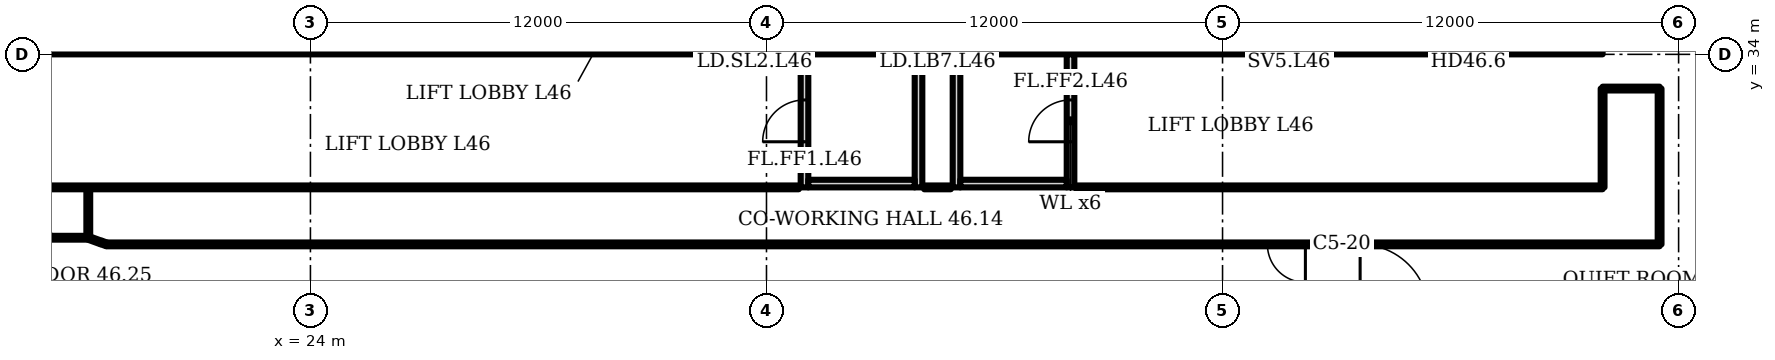
"""IFC4 building model, lengths in metres.
Left out: names, types, materials, properties, quantities, classifications, styles, units other than length and angle.
Written with IfcOpenShell. Run it as: python <this file> out.ifc"""

import sys

from ifc_helpers import new_model, si_unit, direction, frame, frame_2d, origin, place, context, subcontext, project, spatial, rectangle, extrude, element, fill, save


model = new_model("IFC4")
c1 = context("Model", 3, precision=1e-05, world=origin(), true_north=direction((0.0, 1.0)))
c2 = subcontext(c1, "Body", "Model", "MODEL_VIEW")
j1 = project(units=[si_unit("LENGTHUNIT", "METRE"), si_unit("PLANEANGLEUNIT", "RADIAN")], contexts=[c1])
p1 = place(None, origin())
s1 = spatial("IfcSite", under=j1, at=p1, CompositionType="ELEMENT")
p2 = place(p1, origin())
s2 = spatial("IfcBuilding", under=s1, at=p2, CompositionType="ELEMENT")
p3 = place(p2, frame((0.0, 0.0, 187.9)))
s3 = spatial("IfcBuildingStorey", under=s2, at=p3, CompositionType="ELEMENT", Elevation=187.9)
p4 = place(p3, frame((16.0, 34.4, 0.0), z_axis=(0.0, 0.0, 1.0), x_axis=(1.0, 0.0, 0.0)))
e1 = element("IfcWall", 1, at=p4, inside=s3, PredefinedType="SHEAR", context=c2, shape_type="SweptSolid", body=[
    extrude(rectangle(XDim=42.0, YDim=0.8, at=frame_2d((21.0, 0.0))), origin(), (0.0, 0.0, 1.0), 3.6),
])
p5 = place(p4, frame((3.2, 0.0, 0.0)))
e2 = element("IfcOpeningElement", 2, at=p5, cuts=e1, PredefinedType="OPENING", context=c2, shape_type="SweptSolid", body=[
    extrude(rectangle(XDim=1.0, YDim=2.1, at=frame_2d((0.5, 1.05))), frame((0.0, 0.41, 0.0), z_axis=(0.0, -1.0, 0.0), x_axis=(1.0, 0.0, 0.0)), (0.0, 0.0, 1.0), 0.82),
])
p6 = place(p4, frame((7.65, 0.0, 0.0)))
e3 = element("IfcOpeningElement", 3, at=p6, cuts=e1, PredefinedType="OPENING", context=c2, shape_type="SweptSolid", body=[
    extrude(rectangle(XDim=1.2, YDim=2.1, at=frame_2d((0.6, 1.05))), frame((0.0, 0.41, 0.0), z_axis=(0.0, -1.0, 0.0), x_axis=(1.0, 0.0, 0.0)), (0.0, 0.0, 1.0), 0.82),
])
p7 = place(p4, frame((14.767, 0.0, 0.0)))
e4 = element("IfcOpeningElement", 4, at=p7, cuts=e1, PredefinedType="OPENING", context=c2, shape_type="SweptSolid", body=[
    extrude(rectangle(XDim=1.1, YDim=2.1, at=frame_2d((0.55, 1.05))), frame((0.0, 0.41, 0.0), z_axis=(0.0, -1.0, 0.0), x_axis=(1.0, 0.0, 0.0)), (0.0, 0.0, 1.0), 0.82),
])
p8 = place(p4, frame((19.133, 0.0, 0.0)))
e5 = element("IfcOpeningElement", 5, at=p8, cuts=e1, PredefinedType="OPENING", context=c2, shape_type="SweptSolid", body=[
    extrude(rectangle(XDim=1.1, YDim=2.1, at=frame_2d((0.55, 1.05))), frame((0.0, 0.41, 0.0), z_axis=(0.0, -1.0, 0.0), x_axis=(1.0, 0.0, 0.0)), (0.0, 0.0, 1.0), 0.82),
])
p9 = place(p4, frame((16.8, 0.0, 0.0)))
e6 = element("IfcOpeningElement", 6, at=p9, cuts=e1, PredefinedType="OPENING", context=c2, shape_type="SweptSolid", body=[
    extrude(rectangle(XDim=1.4, YDim=2.1, at=frame_2d((0.7, 1.05))), frame((0.0, 0.41, 0.0), z_axis=(0.0, -1.0, 0.0), x_axis=(1.0, 0.0, 0.0)), (0.0, 0.0, 1.0), 0.82),
])
p10 = place(p4, frame((21.767, 0.0, 0.0)))
e7 = element("IfcOpeningElement", 7, at=p10, cuts=e1, PredefinedType="OPENING", context=c2, shape_type="SweptSolid", body=[
    extrude(rectangle(XDim=1.1, YDim=2.1, at=frame_2d((0.55, 1.05))), frame((0.0, 0.41, 0.0), z_axis=(0.0, -1.0, 0.0), x_axis=(1.0, 0.0, 0.0)), (0.0, 0.0, 1.0), 0.82),
])
p11 = place(p4, frame((23.95, 0.0, 0.0)))
e8 = element("IfcOpeningElement", 8, at=p11, cuts=e1, PredefinedType="OPENING", context=c2, shape_type="SweptSolid", body=[
    extrude(rectangle(XDim=1.1, YDim=2.1, at=frame_2d((0.55, 1.05))), frame((0.0, 0.41, 0.0), z_axis=(0.0, -1.0, 0.0), x_axis=(1.0, 0.0, 0.0)), (0.0, 0.0, 1.0), 0.82),
])
p12 = place(p4, frame((26.133, 0.0, 0.0)))
e9 = element("IfcOpeningElement", 9, at=p12, cuts=e1, PredefinedType="OPENING", context=c2, shape_type="SweptSolid", body=[
    extrude(rectangle(XDim=1.1, YDim=2.1, at=frame_2d((0.55, 1.05))), frame((0.0, 0.41, 0.0), z_axis=(0.0, -1.0, 0.0), x_axis=(1.0, 0.0, 0.0)), (0.0, 0.0, 1.0), 0.82),
])
p13 = place(p4, frame((33.15, 0.0, 0.0)))
e10 = element("IfcOpeningElement", 10, at=p13, cuts=e1, PredefinedType="OPENING", context=c2, shape_type="SweptSolid", body=[
    extrude(rectangle(XDim=1.2, YDim=2.1, at=frame_2d((0.6, 1.05))), frame((0.0, 0.41, 0.0), z_axis=(0.0, -1.0, 0.0), x_axis=(1.0, 0.0, 0.0)), (0.0, 0.0, 1.0), 0.82),
])
p14 = place(p4, frame((35.817, 0.0, 0.0)))
e11 = element("IfcOpeningElement", 11, at=p14, cuts=e1, PredefinedType="OPENING", context=c2, shape_type="SweptSolid", body=[
    extrude(rectangle(XDim=1.0, YDim=2.1, at=frame_2d((0.5, 1.05))), frame((0.0, 0.41, 0.0), z_axis=(0.0, -1.0, 0.0), x_axis=(1.0, 0.0, 0.0)), (0.0, 0.0, 1.0), 0.82),
])
p15 = place(p4, frame((39.95, 0.0, 0.0)))
e12 = element("IfcOpeningElement", 12, at=p15, cuts=e1, PredefinedType="OPENING", context=c2, shape_type="SweptSolid", body=[
    extrude(rectangle(XDim=1.0, YDim=2.1, at=frame_2d((0.5, 1.05))), frame((0.0, 0.41, 0.0), z_axis=(0.0, -1.0, 0.0), x_axis=(1.0, 0.0, 0.0)), (0.0, 0.0, 1.0), 0.82),
])
p16 = place(p4, frame((37.767, 0.0, 0.0)))
e13 = element("IfcOpeningElement", 13, at=p16, cuts=e1, PredefinedType="OPENING", context=c2, shape_type="SweptSolid", body=[
    extrude(rectangle(XDim=1.4, YDim=2.1, at=frame_2d((0.7, 1.05))), frame((0.0, 0.41, 0.0), z_axis=(0.0, -1.0, 0.0), x_axis=(1.0, 0.0, 0.0)), (0.0, 0.0, 1.0), 0.82),
])
p17 = place(p3, frame((37.0, 30.5, 0.0), z_axis=(0.0, 0.0, 1.0), x_axis=(0.0, 1.0, 0.0)))
e14 = element("IfcWall", 14, at=p17, inside=s3, PredefinedType="PARTITIONING", context=c2, shape_type="SweptSolid", body=[
    extrude(rectangle(XDim=3.5, YDim=0.2, at=frame_2d((1.75, 0.0))), origin(), (0.0, 0.0, 1.0), 3.2),
])
p18 = place(p17, frame((1.2, 0.0, 0.0)))
e15 = element("IfcOpeningElement", 15, at=p18, cuts=e14, PredefinedType="OPENING", context=c2, shape_type="SweptSolid", body=[
    extrude(rectangle(XDim=1.1, YDim=2.1, at=frame_2d((0.55, 1.05))), frame((0.0, 0.11, 0.0), z_axis=(0.0, -1.0, 0.0), x_axis=(1.0, 0.0, 0.0)), (0.0, 0.0, 1.0), 0.22),
])
p19 = place(p3, frame((40.0, 30.5, 0.0), z_axis=(0.0, 0.0, 1.0), x_axis=(0.0, 1.0, 0.0)))
e16 = element("IfcWall", 16, at=p19, inside=s3, PredefinedType="PARTITIONING", context=c2, shape_type="SweptSolid", body=[
    extrude(rectangle(XDim=3.5, YDim=0.2, at=frame_2d((1.75, 0.0))), origin(), (0.0, 0.0, 1.0), 3.2),
])
p20 = place(p3, frame((37.1, 30.6, 0.0), z_axis=(0.0, 0.0, 1.0), x_axis=(1.0, 0.0, 0.0)))
e17 = element("IfcWall", 17, at=p20, inside=s3, PredefinedType="PARTITIONING", context=c2, shape_type="SweptSolid", body=[
    extrude(rectangle(XDim=2.8, YDim=0.2, at=frame_2d((1.4, 0.0))), origin(), (0.0, 0.0, 1.0), 3.2),
])
p21 = place(p3, frame((41.0, 30.5, 0.0), z_axis=(0.0, 0.0, 1.0), x_axis=(0.0, 1.0, 0.0)))
e18 = element("IfcWall", 18, at=p21, inside=s3, PredefinedType="PARTITIONING", context=c2, shape_type="SweptSolid", body=[
    extrude(rectangle(XDim=3.5, YDim=0.2, at=frame_2d((1.75, 0.0))), origin(), (0.0, 0.0, 1.0), 3.2),
])
p22 = place(p3, frame((44.0, 30.5, 0.0), z_axis=(0.0, 0.0, 1.0), x_axis=(0.0, 1.0, 0.0)))
e19 = element("IfcWall", 19, at=p22, inside=s3, PredefinedType="PARTITIONING", context=c2, shape_type="SweptSolid", body=[
    extrude(rectangle(XDim=3.5, YDim=0.2, at=frame_2d((1.75, 0.0))), origin(), (0.0, 0.0, 1.0), 3.2),
])
p23 = place(p22, frame((1.2, 0.0, 0.0)))
e20 = element("IfcOpeningElement", 20, at=p23, cuts=e19, PredefinedType="OPENING", context=c2, shape_type="SweptSolid", body=[
    extrude(rectangle(XDim=1.1, YDim=2.1, at=frame_2d((0.55, 1.05))), frame((0.0, 0.11, 0.0), z_axis=(0.0, -1.0, 0.0), x_axis=(1.0, 0.0, 0.0)), (0.0, 0.0, 1.0), 0.22),
])
p24 = place(p3, frame((41.1, 30.6, 0.0), z_axis=(0.0, 0.0, 1.0), x_axis=(1.0, 0.0, 0.0)))
e21 = element("IfcWall", 21, at=p24, inside=s3, PredefinedType="PARTITIONING", context=c2, shape_type="SweptSolid", body=[
    extrude(rectangle(XDim=2.8, YDim=0.2, at=frame_2d((1.4, 0.0))), origin(), (0.0, 0.0, 1.0), 3.2),
])
p25 = place(p3, frame((16.0, 30.5, 0.0), z_axis=(0.0, 0.0, 1.0), x_axis=(1.0, 0.0, 0.0)))
e22 = element("IfcWall", 22, at=p25, inside=s3, PredefinedType="PARTITIONING", context=c2, shape_type="SweptSolid", body=[
    extrude(rectangle(XDim=20.85, YDim=0.1, at=frame_2d((10.425, 0.0))), origin(), (0.0, 0.0, 1.0), 3.2),
])
p26 = place(p3, frame((17.185, 29.175, 0.0), z_axis=(0.0, 0.0, 1.0), x_axis=(1.0, 0.0, 0.0)))
e23 = element("IfcWall", 23, at=p26, inside=s3, PredefinedType="PARTITIONING", context=c2, shape_type="SweptSolid", body=[
    extrude(rectangle(XDim=0.97, YDim=0.1, at=frame_2d((0.485, 0.0))), origin(), (0.0, 0.0, 1.0), 3.2),
])
p27 = place(p3, frame((18.155, 29.18, 0.0), z_axis=(0.0, 0.0, 1.0), x_axis=(0.0, 1.0, 0.0)))
e24 = element("IfcWall", 24, at=p27, inside=s3, PredefinedType="PARTITIONING", context=c2, shape_type="SweptSolid", body=[
    extrude(rectangle(XDim=1.32, YDim=0.1, at=frame_2d((0.66, 0.0))), origin(), (0.0, 0.0, 1.0), 3.2),
])
p28 = place(p3, frame((18.49, 29.05, 0.0), z_axis=(0.0, 0.0, 1.0), x_axis=(-0.939932, 0.341351, 0.0)))
e25 = element("IfcWall", 25, at=p28, inside=s3, PredefinedType="PARTITIONING", context=c2, shape_type="SweptSolid", body=[
    extrude(rectangle(XDim=0.351, YDim=0.1, at=frame_2d((0.176, 0.0))), origin(), (0.0, 0.0, 1.0), 3.2),
])
p29 = place(p3, frame((18.635, 29.0, 0.0), z_axis=(0.0, 0.0, 1.0), x_axis=(-0.937648, 0.347591, 0.0)))
e26 = element("IfcWall", 26, at=p29, inside=s3, PredefinedType="PARTITIONING", context=c2, shape_type="SweptSolid", body=[
    extrude(rectangle(XDim=0.144, YDim=0.1, at=frame_2d((0.072, 0.0))), origin(), (0.0, 0.0, 1.0), 3.2),
])
p30 = place(p3, frame((18.635, 29.0, 0.0), z_axis=(0.0, 0.0, 1.0), x_axis=(1.0, 0.0, 0.0)))
e27 = element("IfcWall", 27, at=p30, inside=s3, PredefinedType="PARTITIONING", context=c2, shape_type="SweptSolid", body=[
    extrude(rectangle(XDim=40.865, YDim=0.1, at=frame_2d((20.433, 0.0))), origin(), (0.0, 0.0, 1.0), 3.2),
])
p31 = place(p30, frame((30.545, 0.0, 0.0)))
e28 = element("IfcOpeningElement", 28, at=p31, cuts=e27, PredefinedType="OPENING", context=c2, shape_type="SweptSolid", body=[
    extrude(rectangle(XDim=1.0, YDim=2.1, at=frame_2d((0.5, 1.05))), frame((0.0, 0.06, 0.0), z_axis=(0.0, -1.0, 0.0), x_axis=(1.0, 0.0, 0.0)), (0.0, 0.0, 1.0), 0.12),
])
p32 = place(p3, frame((58.0, 30.5, 0.0), z_axis=(0.0, 0.0, 1.0), x_axis=(0.0, 1.0, 0.0)))
e29 = element("IfcWall", 29, at=p32, inside=s3, PredefinedType="PARTITIONING", context=c2, shape_type="SweptSolid", body=[
    extrude(rectangle(XDim=2.6, YDim=0.1, at=frame_2d((1.3, 0.0))), origin(), (0.0, 0.0, 1.0), 3.2),
])
p33 = place(p3, frame((58.0, 33.1, 0.0), z_axis=(0.0, 0.0, 1.0), x_axis=(1.0, 0.0, 0.0)))
e30 = element("IfcWall", 30, at=p33, inside=s3, PredefinedType="PARTITIONING", context=c2, shape_type="SweptSolid", body=[
    extrude(rectangle(XDim=1.5, YDim=0.1, at=frame_2d((0.75, 0.0))), origin(), (0.0, 0.0, 1.0), 3.2),
])
p34 = place(p3, frame((59.5, 29.0, 0.0), z_axis=(0.0, 0.0, 1.0), x_axis=(0.0, 1.0, 0.0)))
e31 = element("IfcWall", 31, at=p34, inside=s3, PredefinedType="PARTITIONING", context=c2, shape_type="SweptSolid", body=[
    extrude(rectangle(XDim=4.1, YDim=0.1, at=frame_2d((2.05, 0.0))), origin(), (0.0, 0.0, 1.0), 3.2),
])
p35 = place(p3, frame((40.15, 30.5, 0.0), z_axis=(0.0, 0.0, 1.0), x_axis=(1.0, 0.0, 0.0)))
e32 = element("IfcWall", 32, at=p35, inside=s3, PredefinedType="PARTITIONING", context=c2, shape_type="SweptSolid", body=[
    extrude(rectangle(XDim=0.7, YDim=0.1, at=frame_2d((0.35, 0.0))), origin(), (0.0, 0.0, 1.0), 3.2),
])
p36 = place(p3, frame((44.15, 30.5, 0.0), z_axis=(0.0, 0.0, 1.0), x_axis=(1.0, 0.0, 0.0)))
e33 = element("IfcWall", 33, at=p36, inside=s3, PredefinedType="PARTITIONING", context=c2, shape_type="SweptSolid", body=[
    extrude(rectangle(XDim=13.85, YDim=0.1, at=frame_2d((6.925, 0.0))), origin(), (0.0, 0.0, 1.0), 3.2),
])
p37 = place(p5, origin())
e34 = element("IfcDoor", 34, at=p37, inside=s3, OperationType="SINGLE_SWING_LEFT", PredefinedType="DOOR", context=c2, shape_type="SweptSolid", body=[
    extrude(rectangle(XDim=1.0, YDim=2.1, at=frame_2d((0.5, 1.05))), frame((0.0, 0.4, 0.0), z_axis=(0.0, -1.0, 0.0), x_axis=(1.0, 0.0, 0.0)), (0.0, 0.0, 1.0), 0.8),
])
fill(e2, e34)
p38 = place(p14, origin())
e35 = element("IfcDoor", 35, at=p38, inside=s3, OperationType="SINGLE_SWING_LEFT", PredefinedType="DOOR", context=c2, shape_type="SweptSolid", body=[
    extrude(rectangle(XDim=1.0, YDim=2.1, at=frame_2d((0.5, 1.05))), frame((0.0, 0.4, 0.0), z_axis=(0.0, -1.0, 0.0), x_axis=(1.0, 0.0, 0.0)), (0.0, 0.0, 1.0), 0.8),
])
fill(e11, e35)
p39 = place(p15, origin())
e36 = element("IfcDoor", 36, at=p39, inside=s3, OperationType="SINGLE_SWING_LEFT", PredefinedType="DOOR", context=c2, shape_type="SweptSolid", body=[
    extrude(rectangle(XDim=1.0, YDim=2.1, at=frame_2d((0.5, 1.05))), frame((0.0, 0.4, 0.0), z_axis=(0.0, -1.0, 0.0), x_axis=(1.0, 0.0, 0.0)), (0.0, 0.0, 1.0), 0.8),
])
fill(e12, e36)
p40 = place(p18, origin())
e37 = element("IfcDoor", 37, at=p40, inside=s3, OperationType="SINGLE_SWING_LEFT", PredefinedType="DOOR", context=c2, shape_type="SweptSolid", body=[
    extrude(rectangle(XDim=1.1, YDim=2.1, at=frame_2d((0.55, 1.05))), frame((0.0, 0.025, 0.0), z_axis=(0.0, -1.0, 0.0), x_axis=(1.0, 0.0, 0.0)), (0.0, 0.0, 1.0), 0.05),
])
fill(e15, e37)
p41 = place(p23, origin())
e38 = element("IfcDoor", 38, at=p41, inside=s3, OperationType="SINGLE_SWING_LEFT", PredefinedType="DOOR", context=c2, shape_type="SweptSolid", body=[
    extrude(rectangle(XDim=1.1, YDim=2.1, at=frame_2d((0.55, 1.05))), frame((0.0, 0.025, 0.0), z_axis=(0.0, -1.0, 0.0), x_axis=(1.0, 0.0, 0.0)), (0.0, 0.0, 1.0), 0.05),
])
fill(e20, e38)
p42 = place(p31, origin())
e39 = element("IfcDoor", 39, at=p42, inside=s3, OperationType="SINGLE_SWING_RIGHT", PredefinedType="DOOR", context=c2, shape_type="SweptSolid", body=[
    extrude(rectangle(XDim=1.0, YDim=2.1, at=frame_2d((0.5, 1.05))), frame((0.0, 0.025, 0.0), z_axis=(0.0, -1.0, 0.0), x_axis=(1.0, 0.0, 0.0)), (0.0, 0.0, 1.0), 0.05),
])
fill(e28, e39)
save(model, sys.argv[1])
